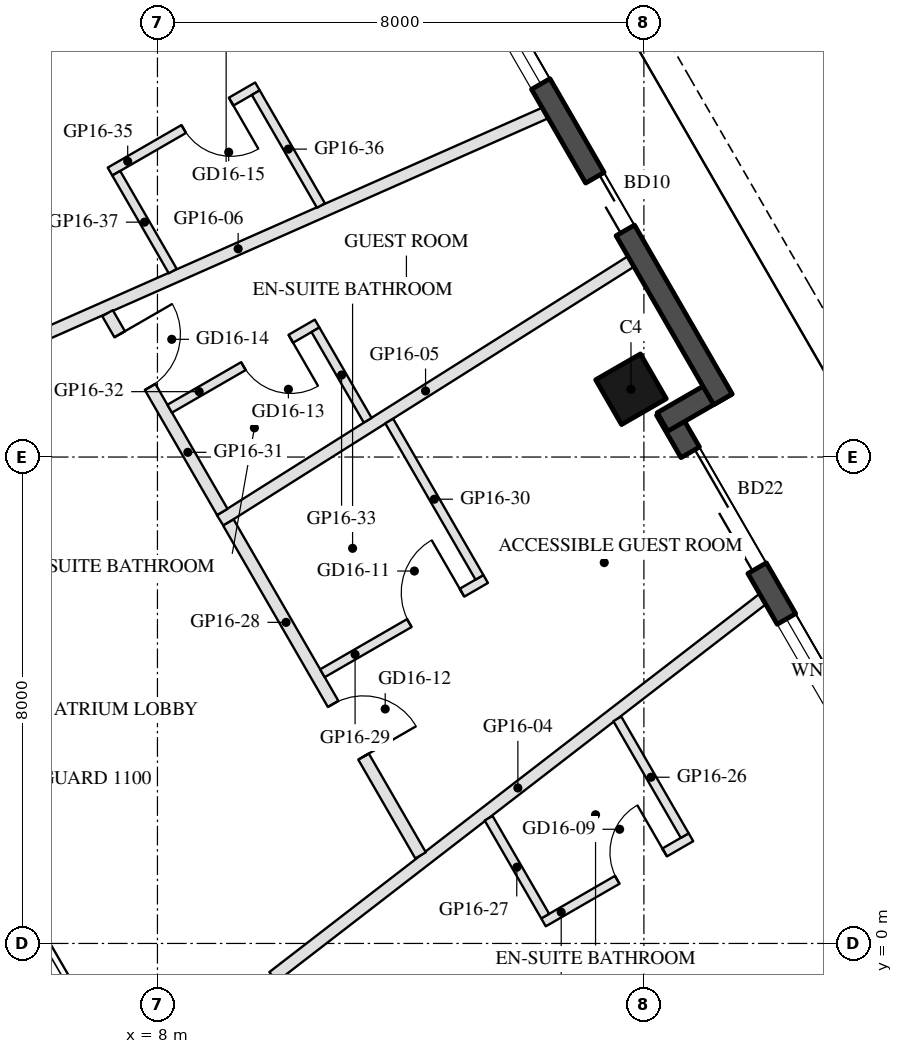
"""IFC4 building model, lengths in metres.
Left out: names, types, materials, properties, quantities, classifications, styles, units other than length and angle.
Written with IfcOpenShell. Run it as: python <this file> out.ifc"""

import sys

from ifc_helpers import new_model, si_unit, direction, frame, frame_2d, origin, origin_2d, place, context, subcontext, project, spatial, rectangle, hollow_rectangle, extrude, element, fill, save


model = new_model("IFC4")
c1 = context("Model", 3, precision=1e-05, world=origin(), true_north=direction((0.0, 1.0)))
c2 = subcontext(c1, "Body", "Model", "MODEL_VIEW")
j1 = project(units=[si_unit("LENGTHUNIT", "METRE"), si_unit("PLANEANGLEUNIT", "RADIAN")], contexts=[c1])
p1 = place(None, origin())
s1 = spatial("IfcSite", under=j1, at=p1, CompositionType="ELEMENT")
p2 = place(p1, origin())
s2 = spatial("IfcBuilding", under=s1, at=p2, CompositionType="ELEMENT")
p3 = place(p2, frame((0.0, 0.0, 176.2)))
s3 = spatial("IfcBuildingStorey", under=s2, at=p3, CompositionType="ELEMENT", Elevation=176.2)
p4 = place(p3, frame((15.788, 9.115, 0.0), z_axis=(0.0, 0.0, 1.0), x_axis=(-0.5, 0.866025403784, 0.0)))
e1 = element("IfcColumn", 1, at=p4, inside=s3, PredefinedType="COLUMN", context=c2, shape_type="SweptSolid", body=[
    extrude(hollow_rectangle(XDim=0.85, YDim=0.85, WallThickness=0.04, at=origin_2d()), origin(), (0.0, 0.0, 1.0), 3.7),
])
p5 = place(p3, frame((19.729, 2.938, 0.0), z_axis=(0.0, 0.0, 1.0), x_axis=(-0.499976430342, 0.866039011305, 0.0)))
e2 = element("IfcWall", 2, at=p5, inside=s3, PredefinedType="SOLIDWALL", context=c2, shape_type="SweptSolid", body=[
    extrude(rectangle(XDim=6.74, YDim=0.35, at=frame_2d((3.37, 0.0))), origin(), (0.0, 0.0, 1.0), 3.55),
])
p6 = place(p5, frame((0.77, 0.0, 0.3)))
e3 = element("IfcOpeningElement", 3, at=p6, cuts=e2, PredefinedType="OPENING", context=c2, shape_type="SweptSolid", body=[
    extrude(rectangle(XDim=2.0, YDim=2.65, at=frame_2d((1.0, 1.325))), frame((0.0, 0.185, 0.0), z_axis=(0.0, -1.0, 0.0), x_axis=(1.0, 0.0, 0.0)), (0.0, 0.0, 1.0), 0.37),
])
p7 = place(p5, frame((3.734, 0.0, 0.0)))
e4 = element("IfcOpeningElement", 4, at=p7, cuts=e2, PredefinedType="OPENING", context=c2, shape_type="SweptSolid", body=[
    extrude(rectangle(XDim=2.2, YDim=2.4, at=frame_2d((1.1, 1.2))), frame((0.0, 0.185, 0.0), z_axis=(0.0, -1.0, 0.0), x_axis=(1.0, 0.0, 0.0)), (0.0, 0.0, 1.0), 0.37),
])
p8 = place(p3, frame((16.306, 8.577, 0.0), z_axis=(0.0, 0.0, 1.0), x_axis=(0.866092288191, 0.499884134912, 0.0)))
e5 = element("IfcWall", 5, at=p8, inside=s3, PredefinedType="SOLIDWALL", context=c2, shape_type="SweptSolid", body=[
    extrude(rectangle(XDim=1.22, YDim=0.35, at=frame_2d((0.61, 0.0))), origin(), (0.0, 0.0, 1.0), 3.55),
])
p9 = place(p3, frame((17.299, 8.948, 0.0), z_axis=(0.0, 0.0, 1.0), x_axis=(-0.500010041276, 0.866019606374, 0.0)))
e6 = element("IfcWall", 6, at=p9, inside=s3, PredefinedType="SOLIDWALL", context=c2, shape_type="SweptSolid", body=[
    extrude(rectangle(XDim=9.7, YDim=0.35, at=frame_2d((4.85, 0.0))), origin(), (0.0, 0.0, 1.0), 3.55),
])
p10 = place(p9, frame((3.21, 0.0, 0.0)))
e7 = element("IfcOpeningElement", 7, at=p10, cuts=e6, PredefinedType="OPENING", context=c2, shape_type="SweptSolid", body=[
    extrude(rectangle(XDim=1.0, YDim=2.4, at=frame_2d((0.5, 1.2))), frame((0.0, 0.185, 0.0), z_axis=(0.0, -1.0, 0.0), x_axis=(1.0, 0.0, 0.0)), (0.0, 0.0, 1.0), 0.37),
])
p11 = place(p9, frame((5.99, 0.0, 0.3)))
e8 = element("IfcOpeningElement", 8, at=p11, cuts=e6, PredefinedType="OPENING", context=c2, shape_type="SweptSolid", body=[
    extrude(rectangle(XDim=2.0, YDim=2.65, at=frame_2d((1.0, 1.325))), frame((0.0, 0.185, 0.0), z_axis=(0.0, -1.0, 0.0), x_axis=(1.0, 0.0, 0.0)), (0.0, 0.0, 1.0), 0.37),
])
p12 = place(p3, frame((17.953, 5.664, 0.0), z_axis=(0.0, 0.0, 1.0), x_axis=(-0.791642262136, -0.610984884264, 0.0)))
e9 = element("IfcWall", 9, at=p12, inside=s3, PredefinedType="PARTITIONING", context=c2, shape_type="SweptSolid", body=[
    extrude(rectangle(XDim=10.171, YDim=0.2, at=frame_2d((5.085, 0.0))), origin(), (0.0, 0.0, 1.0), 2.95),
])
p13 = place(p3, frame((15.787, 11.216, 0.0), z_axis=(0.0, 0.0, 1.0), x_axis=(-0.845894721315, -0.533349904332, 0.0)))
e10 = element("IfcWall", 10, at=p13, inside=s3, PredefinedType="PARTITIONING", context=c2, shape_type="SweptSolid", body=[
    extrude(rectangle(XDim=7.986, YDim=0.2, at=frame_2d((3.993, 0.0))), origin(), (0.0, 0.0, 1.0), 3.06),
])
p14 = place(p3, frame((14.377, 13.658, 0.0), z_axis=(0.0, 0.0, 1.0), x_axis=(-0.914546661299, -0.404480412762, 0.0)))
e11 = element("IfcWall", 11, at=p14, inside=s3, PredefinedType="PARTITIONING", context=c2, shape_type="SweptSolid", body=[
    extrude(rectangle(XDim=11.043, YDim=0.2, at=frame_2d((5.521, 0.0))), origin(), (0.0, 0.0, 1.0), 3.06),
])
p15 = place(p3, frame((14.349, 0.347, 0.0), z_axis=(0.0, 0.0, 1.0), x_axis=(0.866034573852, 0.49998411664, 0.0)))
e12 = element("IfcWall", 12, at=p15, inside=s3, PredefinedType="PARTITIONING", context=c2, shape_type="SweptSolid", body=[
    extrude(rectangle(XDim=2.8, YDim=0.15, at=frame_2d((1.4, 0.0))), origin(), (0.0, 0.0, 1.0), 3.55),
])
p16 = place(p15, frame((1.4, 0.0, 0.0)))
e13 = element("IfcOpeningElement", 13, at=p16, cuts=e12, PredefinedType="OPENING", context=c2, shape_type="SweptSolid", body=[
    extrude(rectangle(XDim=0.9, YDim=2.1, at=frame_2d((0.45, 1.05))), frame((0.0, 0.085, 0.0), z_axis=(0.0, -1.0, 0.0), x_axis=(1.0, 0.0, 0.0)), (0.0, 0.0, 1.0), 0.17),
])
p17 = place(p3, frame((16.671, 1.774, 0.0), z_axis=(0.0, 0.0, 1.0), x_axis=(-0.499941746681, 0.866059033742, 0.0)))
e14 = element("IfcWall", 14, at=p17, inside=s3, PredefinedType="PARTITIONING", context=c2, shape_type="SweptSolid", body=[
    extrude(rectangle(XDim=2.217, YDim=0.15, at=frame_2d((1.108, 0.0))), origin(), (0.0, 0.0, 1.0), 3.55),
])
p18 = place(p3, frame((14.377, 0.449, 0.0), z_axis=(0.0, 0.0, 1.0), x_axis=(-0.500063286585, 0.865988862174, 0.0)))
e15 = element("IfcWall", 15, at=p18, inside=s3, PredefinedType="PARTITIONING", context=c2, shape_type="SweptSolid", body=[
    extrude(rectangle(XDim=1.86, YDim=0.15, at=frame_2d((0.93, 0.0))), origin(), (0.0, 0.0, 1.0), 3.55),
])
p19 = place(p3, frame((9.166, 6.924, 0.0), z_axis=(0.0, 0.0, 1.0), x_axis=(0.499997689051, -0.866026738007, 0.0)))
e16 = element("IfcWall", 16, at=p19, inside=s3, PredefinedType="PARTITIONING", context=c2, shape_type="SweptSolid", body=[
    extrude(rectangle(XDim=6.322, YDim=0.2, at=frame_2d((3.161, 0.0))), origin(), (0.0, 0.0, 1.0), 2.95),
])
p20 = place(p19, frame((3.446, 0.0, 0.0)))
e17 = element("IfcOpeningElement", 17, at=p20, cuts=e16, PredefinedType="OPENING", context=c2, shape_type="SweptSolid", body=[
    extrude(rectangle(XDim=1.0, YDim=2.1, at=frame_2d((0.5, 1.05))), frame((0.0, 0.11, 0.0), z_axis=(0.0, -1.0, 0.0), x_axis=(1.0, 0.0, 0.0)), (0.0, 0.0, 1.0), 0.22),
])
p21 = place(p3, frame((10.713, 4.444, 0.0), z_axis=(0.0, 0.0, 1.0), x_axis=(0.86602952684, 0.49999285859, 0.0)))
e18 = element("IfcWall", 18, at=p21, inside=s3, PredefinedType="PARTITIONING", context=c2, shape_type="SweptSolid", body=[
    extrude(rectangle(XDim=3.1, YDim=0.15, at=frame_2d((1.55, 0.0))), origin(), (0.0, 0.0, 1.0), 3.55),
])
p22 = place(p21, frame((1.65, 0.0, 0.0)))
e19 = element("IfcOpeningElement", 19, at=p22, cuts=e18, PredefinedType="OPENING", context=c2, shape_type="SweptSolid", body=[
    extrude(rectangle(XDim=1.0, YDim=2.1, at=frame_2d((0.5, 1.05))), frame((0.0, 0.085, 0.0), z_axis=(0.0, -1.0, 0.0), x_axis=(1.0, 0.0, 0.0)), (0.0, 0.0, 1.0), 0.17),
])
p23 = place(p3, frame((13.296, 6.021, 0.0), z_axis=(0.0, 0.0, 1.0), x_axis=(-0.499978799242, 0.866037643702, 0.0)))
e20 = element("IfcWall", 20, at=p23, inside=s3, PredefinedType="PARTITIONING", context=c2, shape_type="SweptSolid", body=[
    extrude(rectangle(XDim=2.968, YDim=0.15, at=frame_2d((1.484, 0.0))), origin(), (0.0, 0.0, 1.0), 2.95),
])
p24 = place(p3, frame((7.179, 10.365, 0.0), z_axis=(0.0, 0.0, 1.0), x_axis=(0.500021083992, -0.866013230594, 0.0)))
e21 = element("IfcWall", 21, at=p24, inside=s3, PredefinedType="PARTITIONING", context=c2, shape_type="SweptSolid", body=[
    extrude(rectangle(XDim=3.774, YDim=0.2, at=frame_2d((1.887, 0.0))), origin(), (0.0, 0.0, 1.0), 2.95),
])
p25 = place(p24, frame((0.4, 0.0, 0.0)))
e22 = element("IfcOpeningElement", 22, at=p25, cuts=e21, PredefinedType="OPENING", context=c2, shape_type="SweptSolid", body=[
    extrude(rectangle(XDim=1.0, YDim=2.1, at=frame_2d((0.5, 1.05))), frame((0.0, 0.11, 0.0), z_axis=(0.0, -1.0, 0.0), x_axis=(1.0, 0.0, 0.0)), (0.0, 0.0, 1.0), 0.22),
])
p26 = place(p3, frame((10.626, 10.195, 0.0), z_axis=(0.0, 0.0, 1.0), x_axis=(-0.865996816683, -0.500049511043, 0.0)))
e23 = element("IfcWall", 23, at=p26, inside=s3, PredefinedType="PARTITIONING", context=c2, shape_type="SweptSolid", body=[
    extrude(rectangle(XDim=2.8, YDim=0.15, at=frame_2d((1.4, 0.0))), origin(), (0.0, 0.0, 1.0), 3.55),
])
p27 = place(p26, frame((0.5, 0.0, 0.0)))
e24 = element("IfcOpeningElement", 24, at=p27, cuts=e23, PredefinedType="OPENING", context=c2, shape_type="SweptSolid", body=[
    extrude(rectangle(XDim=0.9, YDim=2.1, at=frame_2d((0.45, 1.05))), frame((0.0, 0.085, 0.0), z_axis=(0.0, -1.0, 0.0), x_axis=(1.0, 0.0, 0.0)), (0.0, 0.0, 1.0), 0.17),
])
p28 = place(p3, frame((11.458, 8.605, 0.0), z_axis=(0.0, 0.0, 1.0), x_axis=(-0.499898763811, 0.866083844636, 0.0)))
e25 = element("IfcWall", 25, at=p28, inside=s3, PredefinedType="PARTITIONING", context=c2, shape_type="SweptSolid", body=[
    extrude(rectangle(XDim=1.718, YDim=0.15, at=frame_2d((0.859, 0.0))), origin(), (0.0, 0.0, 1.0), 3.55),
])
p29 = place(p3, frame((9.645, 14.095, 0.0), z_axis=(0.0, 0.0, 1.0), x_axis=(-0.865996816683, -0.500049511043, 0.0)))
e26 = element("IfcWall", 26, at=p29, inside=s3, PredefinedType="PARTITIONING", context=c2, shape_type="SweptSolid", body=[
    extrude(rectangle(XDim=2.8, YDim=0.15, at=frame_2d((1.4, 0.0))), origin(), (0.0, 0.0, 1.0), 3.55),
])
p30 = place(p29, frame((0.5, 0.0, 0.0)))
e27 = element("IfcOpeningElement", 27, at=p30, cuts=e26, PredefinedType="OPENING", context=c2, shape_type="SweptSolid", body=[
    extrude(rectangle(XDim=0.9, YDim=2.1, at=frame_2d((0.45, 1.05))), frame((0.0, 0.085, 0.0), z_axis=(0.0, -1.0, 0.0), x_axis=(1.0, 0.0, 0.0)), (0.0, 0.0, 1.0), 0.17),
])
p31 = place(p3, frame((10.689, 12.136, 0.0), z_axis=(0.0, 0.0, 1.0), x_axis=(-0.499949244157, 0.866054705701, 0.0)))
e28 = element("IfcWall", 28, at=p31, inside=s3, PredefinedType="PARTITIONING", context=c2, shape_type="SweptSolid", body=[
    extrude(rectangle(XDim=2.143, YDim=0.15, at=frame_2d((1.072, 0.0))), origin(), (0.0, 0.0, 1.0), 3.55),
])
p32 = place(p3, frame((8.251, 11.059, 0.0), z_axis=(0.0, 0.0, 1.0), x_axis=(-0.500025795397, 0.866010510293, 0.0)))
e29 = element("IfcWall", 29, at=p32, inside=s3, PredefinedType="PARTITIONING", context=c2, shape_type="SweptSolid", body=[
    extrude(rectangle(XDim=1.858, YDim=0.15, at=frame_2d((0.929, 0.0))), origin(), (0.0, 0.0, 1.0), 3.55),
])
p33 = place(p6, origin())
e30 = element("IfcWindow", 30, at=p33, inside=s3, PartitioningType="SINGLE_PANEL", PredefinedType="WINDOW", context=c2, shape_type="SweptSolid", body=[
    extrude(rectangle(XDim=2.0, YDim=2.65, at=frame_2d((1.0, 1.325))), frame((0.0, 0.03, 0.0), z_axis=(0.0, -1.0, 0.0), x_axis=(1.0, 0.0, 0.0)), (0.0, 0.0, 1.0), 0.06),
])
fill(e3, e30)
p34 = place(p7, frame((2.2, 0.0, 0.0), z_axis=(0.0, 0.0, 1.0), x_axis=(-1.0, 0.0, 0.0)))
e31 = element("IfcDoor", 31, at=p34, inside=s3, OperationType="SLIDING_TO_LEFT", PredefinedType="DOOR", context=c2, shape_type="SweptSolid", body=[
    extrude(rectangle(XDim=2.2, YDim=2.4, at=frame_2d((1.1, 1.2))), frame((0.0, 0.025, 0.0), z_axis=(0.0, -1.0, 0.0), x_axis=(1.0, 0.0, 0.0)), (0.0, 0.0, 1.0), 0.05),
])
fill(e4, e31)
p35 = place(p10, frame((1.0, 0.0, 0.0), z_axis=(0.0, 0.0, 1.0), x_axis=(-1.0, 0.0, 0.0)))
e32 = element("IfcDoor", 32, at=p35, inside=s3, OperationType="SLIDING_TO_LEFT", PredefinedType="DOOR", context=c2, shape_type="SweptSolid", body=[
    extrude(rectangle(XDim=1.0, YDim=2.4, at=frame_2d((0.5, 1.2))), frame((0.0, 0.025, 0.0), z_axis=(0.0, -1.0, 0.0), x_axis=(1.0, 0.0, 0.0)), (0.0, 0.0, 1.0), 0.05),
])
fill(e7, e32)
p36 = place(p11, origin())
e33 = element("IfcWindow", 33, at=p36, inside=s3, PartitioningType="SINGLE_PANEL", PredefinedType="WINDOW", context=c2, shape_type="SweptSolid", body=[
    extrude(rectangle(XDim=2.0, YDim=2.65, at=frame_2d((1.0, 1.325))), frame((0.0, 0.03, 0.0), z_axis=(0.0, -1.0, 0.0), x_axis=(1.0, 0.0, 0.0)), (0.0, 0.0, 1.0), 0.06),
])
fill(e8, e33)
p37 = place(p16, origin())
e34 = element("IfcDoor", 34, at=p37, inside=s3, OperationType="SINGLE_SWING_RIGHT", PredefinedType="DOOR", context=c2, shape_type="SweptSolid", body=[
    extrude(rectangle(XDim=0.9, YDim=2.1, at=frame_2d((0.45, 1.05))), frame((0.0, 0.025, 0.0), z_axis=(0.0, -1.0, 0.0), x_axis=(1.0, 0.0, 0.0)), (0.0, 0.0, 1.0), 0.05),
])
fill(e13, e34)
p38 = place(p22, origin())
e35 = element("IfcDoor", 35, at=p38, inside=s3, OperationType="SINGLE_SWING_RIGHT", PredefinedType="DOOR", context=c2, shape_type="SweptSolid", body=[
    extrude(rectangle(XDim=1.0, YDim=2.1, at=frame_2d((0.5, 1.05))), frame((0.0, 0.025, 0.0), z_axis=(0.0, -1.0, 0.0), x_axis=(1.0, 0.0, 0.0)), (0.0, 0.0, 1.0), 0.05),
])
fill(e19, e35)
p39 = place(p20, origin())
e36 = element("IfcDoor", 36, at=p39, inside=s3, OperationType="SINGLE_SWING_RIGHT", PredefinedType="DOOR", context=c2, shape_type="SweptSolid", body=[
    extrude(rectangle(XDim=1.0, YDim=2.1, at=frame_2d((0.5, 1.05))), frame((0.0, 0.025, 0.0), z_axis=(0.0, -1.0, 0.0), x_axis=(1.0, 0.0, 0.0)), (0.0, 0.0, 1.0), 0.05),
])
fill(e17, e36)
p40 = place(p27, origin())
e37 = element("IfcDoor", 37, at=p40, inside=s3, OperationType="SINGLE_SWING_LEFT", PredefinedType="DOOR", context=c2, shape_type="SweptSolid", body=[
    extrude(rectangle(XDim=0.9, YDim=2.1, at=frame_2d((0.45, 1.05))), frame((0.0, 0.025, 0.0), z_axis=(0.0, -1.0, 0.0), x_axis=(1.0, 0.0, 0.0)), (0.0, 0.0, 1.0), 0.05),
])
fill(e24, e37)
p41 = place(p25, origin())
e38 = element("IfcDoor", 38, at=p41, inside=s3, OperationType="SINGLE_SWING_LEFT", PredefinedType="DOOR", context=c2, shape_type="SweptSolid", body=[
    extrude(rectangle(XDim=1.0, YDim=2.1, at=frame_2d((0.5, 1.05))), frame((0.0, 0.025, 0.0), z_axis=(0.0, -1.0, 0.0), x_axis=(1.0, 0.0, 0.0)), (0.0, 0.0, 1.0), 0.05),
])
fill(e22, e38)
p42 = place(p30, origin())
e39 = element("IfcDoor", 39, at=p42, inside=s3, OperationType="SINGLE_SWING_LEFT", PredefinedType="DOOR", context=c2, shape_type="SweptSolid", body=[
    extrude(rectangle(XDim=0.9, YDim=2.1, at=frame_2d((0.45, 1.05))), frame((0.0, 0.025, 0.0), z_axis=(0.0, -1.0, 0.0), x_axis=(1.0, 0.0, 0.0)), (0.0, 0.0, 1.0), 0.05),
])
fill(e27, e39)
save(model, sys.argv[1])
